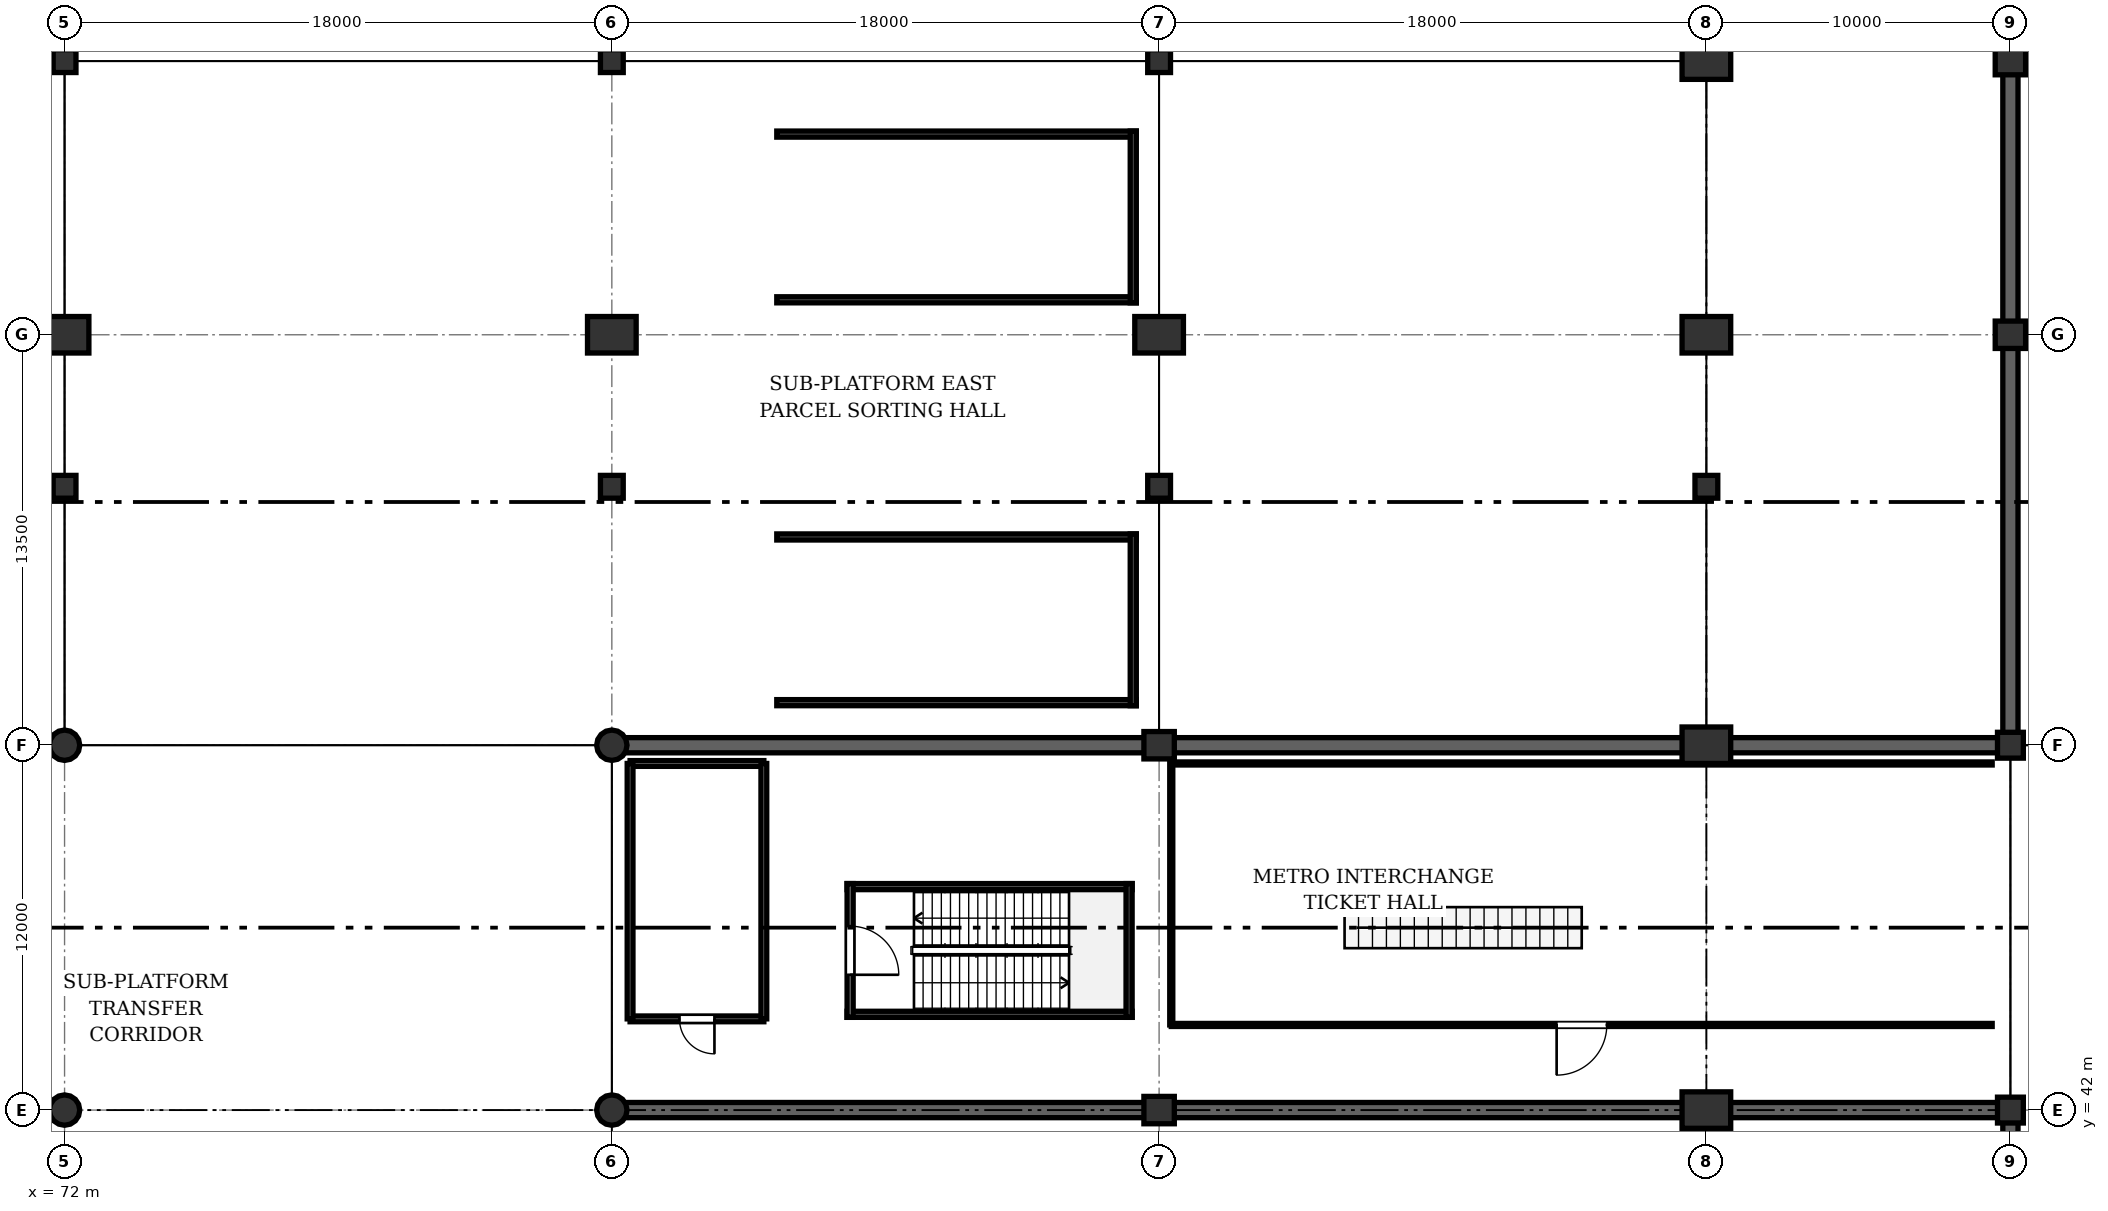
"""IFC4 building model, lengths in metres.
Left out: names, types, materials, properties, quantities, classifications, styles, units other than length and angle.
Written with IfcOpenShell. Run it as: python <this file> out.ifc"""

import sys

from ifc_helpers import new_model, si_unit, direction, frame, frame_2d, origin, origin_2d, place, context, subcontext, project, spatial, rectangle, circle, extrude, element, fill, save


model = new_model("IFC4")
c1 = context("Model", 3, precision=1e-05, world=origin(), true_north=direction((0.0, 1.0)))
c2 = subcontext(c1, "Body", "Model", "MODEL_VIEW")
j1 = project(units=[si_unit("LENGTHUNIT", "METRE"), si_unit("PLANEANGLEUNIT", "RADIAN")], contexts=[c1])
p1 = place(None, origin())
s1 = spatial("IfcSite", under=j1, at=p1, CompositionType="ELEMENT")
p2 = place(p1, origin())
s2 = spatial("IfcBuilding", under=s1, at=p2, CompositionType="ELEMENT")
p3 = place(p2, frame((0.0, 0.0, -5.4)))
s3 = spatial("IfcBuildingStorey", under=s2, at=p3, CompositionType="ELEMENT", Elevation=-5.4)
for number, where, z_axis, x_axis in (
    (1, (72.0, 42.0, 0.0), (0.0, 0.0, 1.0), (1.0, 0.0, 0.0)),
    (2, (72.0, 54.0, 0.0), (0.0, 0.0, 1.0), (1.0, 0.0, 0.0)),
):
    element("IfcColumn", number, at=place(p3, frame(where, z_axis=z_axis, x_axis=x_axis)), inside=s3, PredefinedType="COLUMN", context=c2, shape_type="SweptSolid", body=[
        extrude(circle(Radius=0.5, at=origin_2d()), origin(), (0.0, 0.0, 1.0), 5.4),
    ])
p4 = place(p3, frame((72.0, 67.5, 0.0), z_axis=(0.0, 0.0, 1.0), x_axis=(1.0, 0.0, 0.0)))
e3 = element("IfcColumn", 3, at=p4, inside=s3, PredefinedType="COLUMN", context=c2, shape_type="SweptSolid", body=[
    extrude(rectangle(XDim=1.6, YDim=1.2, at=origin_2d()), origin(), (0.0, 0.0, 1.0), 5.4),
])
for number, where, z_axis, x_axis in (
    (4, (90.0, 42.0, 0.0), (0.0, 0.0, 1.0), (1.0, 0.0, 0.0)),
    (5, (90.0, 54.0, 0.0), (0.0, 0.0, 1.0), (1.0, 0.0, 0.0)),
):
    element("IfcColumn", number, at=place(p3, frame(where, z_axis=z_axis, x_axis=x_axis)), inside=s3, PredefinedType="COLUMN", context=c2, shape_type="SweptSolid", body=[
        extrude(circle(Radius=0.5, at=origin_2d()), origin(), (0.0, 0.0, 1.0), 5.4),
    ])
p5 = place(p3, frame((90.0, 67.5, 0.0), z_axis=(0.0, 0.0, 1.0), x_axis=(1.0, 0.0, 0.0)))
e6 = element("IfcColumn", 6, at=p5, inside=s3, PredefinedType="COLUMN", context=c2, shape_type="SweptSolid", body=[
    extrude(rectangle(XDim=1.6, YDim=1.2, at=origin_2d()), origin(), (0.0, 0.0, 1.0), 5.4),
])
for number, where, z_axis, x_axis in (
    (7, (108.0, 42.0, 0.0), (0.0, 0.0, 1.0), (1.0, 0.0, 0.0)),
    (8, (108.0, 54.0, 0.0), (0.0, 0.0, 1.0), (1.0, 0.0, 0.0)),
):
    element("IfcColumn", number, at=place(p3, frame(where, z_axis=z_axis, x_axis=x_axis)), inside=s3, PredefinedType="COLUMN", context=c2, shape_type="SweptSolid", body=[
        extrude(rectangle(XDim=1.0, YDim=0.9, at=origin_2d()), origin(), (0.0, 0.0, 1.0), 5.4),
    ])
for number, where, z_axis, x_axis in (
    (9, (108.0, 67.5, 0.0), (0.0, 0.0, 1.0), (1.0, 0.0, 0.0)),
    (10, (126.0, 42.0, 0.0), (0.0, 0.0, 1.0), (1.0, 0.0, 0.0)),
    (11, (126.0, 54.0, 0.0), (0.0, 0.0, 1.0), (1.0, 0.0, 0.0)),
    (12, (126.0, 67.5, 0.0), (0.0, 0.0, 1.0), (1.0, 0.0, 0.0)),
    (13, (126.0, 76.5, 0.0), (0.0, 0.0, 1.0), (1.0, 0.0, 0.0)),
):
    element("IfcColumn", number, at=place(p3, frame(where, z_axis=z_axis, x_axis=x_axis)), inside=s3, PredefinedType="COLUMN", context=c2, shape_type="SweptSolid", body=[
        extrude(rectangle(XDim=1.6, YDim=1.2, at=origin_2d()), origin(), (0.0, 0.0, 1.0), 5.4),
    ])
for number, where, z_axis, x_axis in (
    (14, (136.0, 42.0, 0.0), (0.0, 0.0, 1.0), (1.0, 0.0, 0.0)),
    (15, (136.0, 54.0, 0.0), (0.0, 0.0, 1.0), (1.0, 0.0, 0.0)),
):
    element("IfcColumn", number, at=place(p3, frame(where, z_axis=z_axis, x_axis=x_axis)), inside=s3, PredefinedType="COLUMN", context=c2, shape_type="SweptSolid", body=[
        extrude(rectangle(XDim=0.85, YDim=0.85, at=origin_2d()), origin(), (0.0, 0.0, 1.0), 5.4),
    ])
for number, where, z_axis, x_axis in (
    (16, (136.0, 67.5, 0.0), (0.0, 0.0, 1.0), (1.0, 0.0, 0.0)),
    (17, (136.0, 76.5, 0.0), (0.0, 0.0, 1.0), (1.0, 0.0, 0.0)),
):
    element("IfcColumn", number, at=place(p3, frame(where, z_axis=z_axis, x_axis=x_axis)), inside=s3, PredefinedType="COLUMN", context=c2, shape_type="SweptSolid", body=[
        extrude(rectangle(XDim=1.0, YDim=0.9, at=origin_2d()), origin(), (0.0, 0.0, 1.0), 5.4),
    ])
for number, where, z_axis, x_axis in (
    (18, (72.0, 62.5, 0.0), (0.0, 0.0, 1.0), (1.0, 0.0, 0.0)),
    (19, (90.0, 62.5, 0.0), (0.0, 0.0, 1.0), (1.0, 0.0, 0.0)),
    (20, (108.0, 62.5, 0.0), (0.0, 0.0, 1.0), (1.0, 0.0, 0.0)),
    (21, (126.0, 62.5, 0.0), (0.0, 0.0, 1.0), (1.0, 0.0, 0.0)),
):
    element("IfcColumn", number, at=place(p3, frame(where, z_axis=z_axis, x_axis=x_axis)), inside=s3, PredefinedType="COLUMN", context=c2, shape_type="SweptSolid", body=[
        extrude(rectangle(XDim=0.75, YDim=0.75, at=origin_2d()), origin(), (0.0, 0.0, 1.0), 5.02),
    ])
for number, where, z_axis, x_axis in (
    (22, (72.0, 76.5, 0.0), (0.0, 0.0, 1.0), (1.0, 0.0, 0.0)),
    (23, (90.0, 76.5, 0.0), (0.0, 0.0, 1.0), (1.0, 0.0, 0.0)),
    (24, (108.0, 76.5, 0.0), (0.0, 0.0, 1.0), (1.0, 0.0, 0.0)),
):
    element("IfcColumn", number, at=place(p3, frame(where, z_axis=z_axis, x_axis=x_axis)), inside=s3, PredefinedType="COLUMN", context=c2, shape_type="SweptSolid", body=[
        extrude(rectangle(XDim=0.75, YDim=0.75, at=origin_2d()), origin(), (0.0, 0.0, 1.0), 3.5),
    ])
p6 = place(p3, frame((136.0, 126.0, 0.0), z_axis=(0.0, 0.0, 1.0), x_axis=(0.0, -1.0, 0.0)))
e25 = element("IfcWall", 25, at=p6, inside=s3, PredefinedType="USERDEFINED", context=c2, shape_type="SweptSolid", body=[
    extrude(rectangle(XDim=72.0, YDim=0.5, at=frame_2d((36.0, 0.0))), origin(), (0.0, 0.0, 1.0), 5.1),
])
p7 = place(p3, frame((136.0, 42.0, 0.0), z_axis=(0.0, 0.0, 1.0), x_axis=(0.0, -1.0, 0.0)))
e26 = element("IfcWall", 26, at=p7, inside=s3, PredefinedType="USERDEFINED", context=c2, shape_type="SweptSolid", body=[
    extrude(rectangle(XDim=42.0, YDim=0.5, at=frame_2d((21.0, 0.0))), origin(), (0.0, 0.0, 1.0), 5.1),
])
for number, where, z_axis, x_axis in (
    (27, (90.0, 54.0, 0.0), (0.0, 0.0, 1.0), (1.0, 0.0, 0.0)),
    (28, (136.0, 42.0, 0.0), (0.0, 0.0, 1.0), (-1.0, 0.0, 0.0)),
):
    element("IfcWall", number, at=place(p3, frame(where, z_axis=z_axis, x_axis=x_axis)), inside=s3, PredefinedType="USERDEFINED", context=c2, shape_type="SweptSolid", body=[
        extrude(rectangle(XDim=46.0, YDim=0.5, at=frame_2d((23.0, 0.0))), origin(), (0.0, 0.0, 1.0), 5.05),
    ])
for number, where, z_axis, x_axis in (
    (29, (95.425, 55.4, 0.0), (0.0, 0.0, 1.0), (1.0, 0.0, 0.0)),
    (30, (107.25, 60.85, 0.0), (0.0, 0.0, 1.0), (-1.0, 0.0, 0.0)),
):
    element("IfcWall", number, at=place(p3, frame(where, z_axis=z_axis, x_axis=x_axis)), inside=s3, PredefinedType="SOLIDWALL", context=c2, shape_type="SweptSolid", body=[
        extrude(rectangle(XDim=11.825, YDim=0.2, at=frame_2d((5.913, 0.0))), origin(), (0.0, 0.0, 1.0), 5.02),
    ])
p8 = place(p3, frame((107.15, 55.3, 0.0), z_axis=(0.0, 0.0, 1.0), x_axis=(0.0, 1.0, 0.0)))
e31 = element("IfcWall", 31, at=p8, inside=s3, PredefinedType="SOLIDWALL", context=c2, shape_type="SweptSolid", body=[
    extrude(rectangle(XDim=5.65, YDim=0.2, at=frame_2d((2.825, 0.0))), origin(), (0.0, 0.0, 1.0), 5.02),
])
for number, where, z_axis, x_axis in (
    (32, (95.425, 68.65, 0.0), (0.0, 0.0, 1.0), (1.0, 0.0, 0.0)),
    (33, (107.25, 74.1, 0.0), (0.0, 0.0, 1.0), (-1.0, 0.0, 0.0)),
):
    element("IfcWall", number, at=place(p3, frame(where, z_axis=z_axis, x_axis=x_axis)), inside=s3, PredefinedType="SOLIDWALL", context=c2, shape_type="SweptSolid", body=[
        extrude(rectangle(XDim=11.825, YDim=0.2, at=frame_2d((5.913, 0.0))), origin(), (0.0, 0.0, 1.0), 5.02),
    ])
p9 = place(p3, frame((107.15, 68.55, 0.0), z_axis=(0.0, 0.0, 1.0), x_axis=(0.0, 1.0, 0.0)))
e34 = element("IfcWall", 34, at=p9, inside=s3, PredefinedType="SOLIDWALL", context=c2, shape_type="SweptSolid", body=[
    extrude(rectangle(XDim=5.65, YDim=0.2, at=frame_2d((2.825, 0.0))), origin(), (0.0, 0.0, 1.0), 5.02),
])
for number, where, z_axis, x_axis in (
    (35, (97.738, 45.15, 0.0), (0.0, 0.0, 1.0), (1.0, 0.0, 0.0)),
    (36, (107.113, 49.35, 0.0), (0.0, 0.0, 1.0), (-1.0, 0.0, 0.0)),
):
    element("IfcWall", number, at=place(p3, frame(where, z_axis=z_axis, x_axis=x_axis)), inside=s3, PredefinedType="SOLIDWALL", context=c2, shape_type="SweptSolid", body=[
        extrude(rectangle(XDim=9.375, YDim=0.2, at=frame_2d((4.688, 0.0))), origin(), (0.0, 0.0, 1.0), 5.05),
    ])
p10 = place(p3, frame((107.012, 45.05, 0.0), z_axis=(0.0, 0.0, 1.0), x_axis=(0.0, 1.0, 0.0)))
e37 = element("IfcWall", 37, at=p10, inside=s3, PredefinedType="SOLIDWALL", context=c2, shape_type="SweptSolid", body=[
    extrude(rectangle(XDim=4.4, YDim=0.2, at=frame_2d((2.2, 0.0))), origin(), (0.0, 0.0, 1.0), 5.05),
])
p11 = place(p3, frame((97.837, 49.45, 0.0), z_axis=(0.0, 0.0, 1.0), x_axis=(0.0, -1.0, 0.0)))
e38 = element("IfcWall", 38, at=p11, inside=s3, PredefinedType="SOLIDWALL", context=c2, shape_type="SweptSolid", body=[
    extrude(rectangle(XDim=4.4, YDim=0.2, at=frame_2d((2.2, 0.0))), origin(), (0.0, 0.0, 1.0), 4.4),
])
p12 = place(p11, frame((1.4, 0.0, 0.0)))
e39 = element("IfcOpeningElement", 39, at=p12, cuts=e38, PredefinedType="OPENING", context=c2, shape_type="SweptSolid", body=[
    extrude(rectangle(XDim=1.6, YDim=2.15, at=frame_2d((0.8, 1.075))), frame((0.0, 0.11, 0.0), z_axis=(0.0, -1.0, 0.0), x_axis=(1.0, 0.0, 0.0)), (0.0, 0.0, 1.0), 0.22),
])
p13 = place(p3, frame((135.4, 44.8, 0.0), z_axis=(0.0, 0.0, 1.0), x_axis=(-1.0, 0.0, 0.0)))
e40 = element("IfcWall", 40, at=p13, inside=s3, PredefinedType="PARTITIONING", context=c2, shape_type="SweptSolid", body=[
    extrude(rectangle(XDim=27.0, YDim=0.1, at=frame_2d((13.5, 0.0))), origin(), (0.0, 0.0, 1.0), 4.4),
])
p14 = place(p13, frame((12.675, 0.0, 0.0)))
e41 = element("IfcOpeningElement", 41, at=p14, cuts=e40, PredefinedType="OPENING", context=c2, shape_type="SweptSolid", body=[
    extrude(rectangle(XDim=1.65, YDim=2.1, at=frame_2d((0.825, 1.05))), frame((0.0, 0.06, 0.0), z_axis=(0.0, -1.0, 0.0), x_axis=(1.0, 0.0, 0.0)), (0.0, 0.0, 1.0), 0.12),
])
p15 = place(p3, frame((108.4, 53.4, 0.0), z_axis=(0.0, 0.0, 1.0), x_axis=(1.0, 0.0, 0.0)))
e42 = element("IfcWall", 42, at=p15, inside=s3, PredefinedType="PARTITIONING", context=c2, shape_type="SweptSolid", body=[
    extrude(rectangle(XDim=27.0, YDim=0.1, at=frame_2d((13.5, 0.0))), origin(), (0.0, 0.0, 1.0), 4.295),
])
p16 = place(p3, frame((108.4, 44.8, 0.0), z_axis=(0.0, 0.0, 1.0), x_axis=(0.0, 1.0, 0.0)))
e43 = element("IfcWall", 43, at=p16, inside=s3, PredefinedType="PARTITIONING", context=c2, shape_type="SweptSolid", body=[
    extrude(rectangle(XDim=8.6, YDim=0.1, at=frame_2d((4.3, 0.0))), origin(), (0.0, 0.0, 1.0), 4.295),
])
p17 = place(p3, frame((95.0, 45.0, 0.0), z_axis=(0.0, 0.0, 1.0), x_axis=(-1.0, 0.0, 0.0)))
e44 = element("IfcWall", 44, at=p17, inside=s3, PredefinedType="PARTITIONING", context=c2, shape_type="SweptSolid", body=[
    extrude(rectangle(XDim=4.4, YDim=0.19, at=frame_2d((2.2, 0.0))), origin(), (0.0, 0.0, 1.0), 4.4),
])
p18 = place(p17, frame((1.625, 0.0, 0.0)))
e45 = element("IfcOpeningElement", 45, at=p18, cuts=e44, PredefinedType="OPENING", context=c2, shape_type="SweptSolid", body=[
    extrude(rectangle(XDim=1.15, YDim=2.1, at=frame_2d((0.575, 1.05))), frame((0.0, 0.105, 0.0), z_axis=(0.0, -1.0, 0.0), x_axis=(1.0, 0.0, 0.0)), (0.0, 0.0, 1.0), 0.21),
])
p19 = place(p3, frame((90.6, 53.4, 0.0), z_axis=(0.0, 0.0, 1.0), x_axis=(1.0, 0.0, 0.0)))
e46 = element("IfcWall", 46, at=p19, inside=s3, PredefinedType="PARTITIONING", context=c2, shape_type="SweptSolid", body=[
    extrude(rectangle(XDim=4.4, YDim=0.19, at=frame_2d((2.2, 0.0))), origin(), (0.0, 0.0, 1.0), 4.295),
])
for number, where, z_axis, x_axis in (
    (47, (90.6, 45.0, 0.0), (0.0, 0.0, 1.0), (0.0, 1.0, 0.0)),
    (48, (95.0, 53.4, 0.0), (0.0, 0.0, 1.0), (0.0, -1.0, 0.0)),
):
    element("IfcWall", number, at=place(p3, frame(where, z_axis=z_axis, x_axis=x_axis)), inside=s3, PredefinedType="PARTITIONING", context=c2, shape_type="SweptSolid", body=[
        extrude(rectangle(XDim=8.4, YDim=0.19, at=frame_2d((4.2, 0.0))), origin(), (0.0, 0.0, 1.0), 4.295),
    ])
p20 = place(p12, origin())
e49 = element("IfcDoor", 49, at=p20, inside=s3, OperationType="SINGLE_SWING_RIGHT", PredefinedType="DOOR", context=c2, shape_type="SweptSolid", body=[
    extrude(rectangle(XDim=1.6, YDim=2.15, at=frame_2d((0.8, 1.075))), frame((0.0, 0.025, 0.0), z_axis=(0.0, -1.0, 0.0), x_axis=(1.0, 0.0, 0.0)), (0.0, 0.0, 1.0), 0.05),
])
fill(e39, e49)
p21 = place(p14, origin())
e50 = element("IfcDoor", 50, at=p21, inside=s3, OperationType="SINGLE_SWING_RIGHT", PredefinedType="DOOR", context=c2, shape_type="SweptSolid", body=[
    extrude(rectangle(XDim=1.65, YDim=2.1, at=frame_2d((0.825, 1.05))), frame((0.0, 0.025, 0.0), z_axis=(0.0, -1.0, 0.0), x_axis=(1.0, 0.0, 0.0)), (0.0, 0.0, 1.0), 0.05),
])
fill(e41, e50)
p22 = place(p18, origin())
e51 = element("IfcDoor", 51, at=p22, inside=s3, OperationType="SINGLE_SWING_LEFT", PredefinedType="DOOR", context=c2, shape_type="SweptSolid", body=[
    extrude(rectangle(XDim=1.15, YDim=2.1, at=frame_2d((0.575, 1.05))), frame((0.0, 0.025, 0.0), z_axis=(0.0, -1.0, 0.0), x_axis=(1.0, 0.0, 0.0)), (0.0, 0.0, 1.0), 0.05),
])
fill(e45, e51)
save(model, sys.argv[1])
